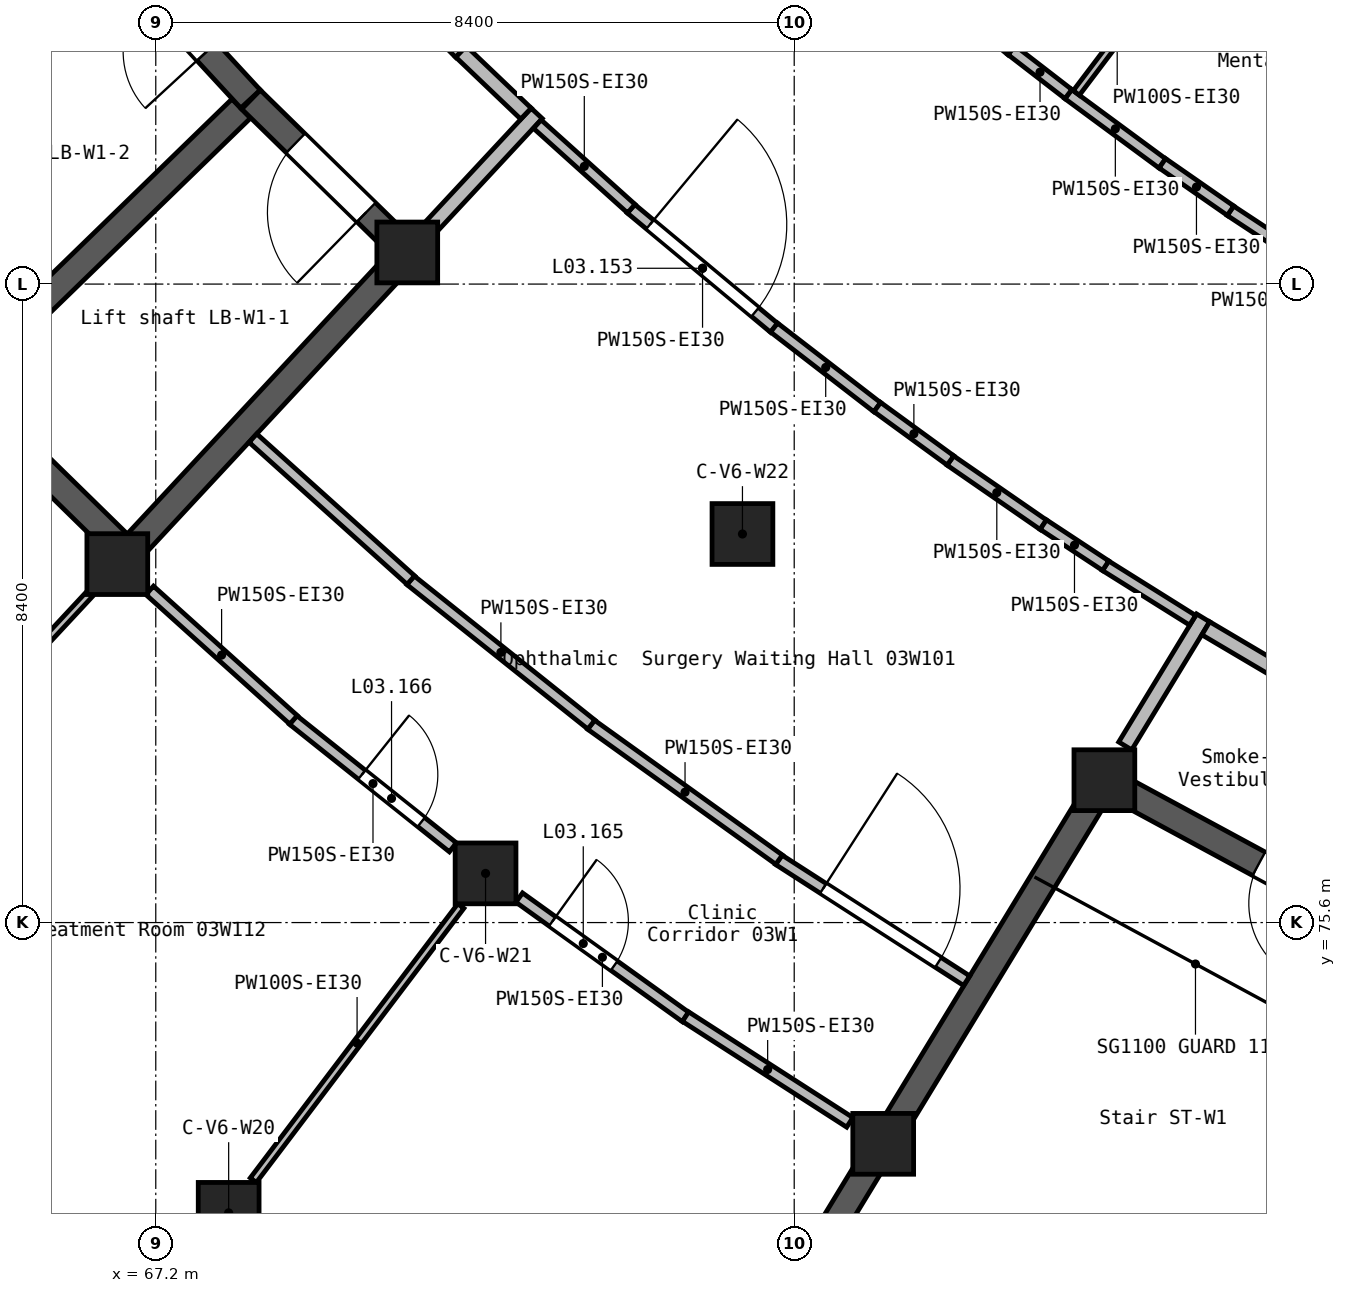
"""IFC4 building model, lengths in metres.
Left out: names, types, materials, properties, quantities, classifications, styles, units other than length and angle.
Written with IfcOpenShell. Run it as: python <this file> out.ifc"""

import sys

from ifc_helpers import new_model, si_unit, direction, frame, frame_2d, origin, origin_2d, place, context, subcontext, project, spatial, rectangle, extrude, element, fill, save


model = new_model("IFC4")
c1 = context("Model", 3, precision=1e-05, world=origin(), true_north=direction((0.0, 1.0)))
c2 = subcontext(c1, "Body", "Model", "MODEL_VIEW")
j1 = project(units=[si_unit("LENGTHUNIT", "METRE"), si_unit("PLANEANGLEUNIT", "RADIAN")], contexts=[c1])
p1 = place(None, origin())
s1 = spatial("IfcSite", under=j1, at=p1, CompositionType="ELEMENT")
p2 = place(p1, origin())
s2 = spatial("IfcBuilding", under=s1, at=p2, CompositionType="ELEMENT")
p3 = place(p2, frame((0.0, 0.0, 16.8)))
s3 = spatial("IfcBuildingStorey", under=s2, at=p3, CompositionType="ELEMENT", Elevation=16.8)
for number, where, z_axis, x_axis in (
    (1, (66.694, 80.316, 0.0), (0.0, 0.0, 1.0), (1.0, 0.0, 0.0)),
    (2, (68.159, 71.781, 0.0), (0.0, 0.0, 1.0), (1.0, 0.0, 0.0)),
    (3, (70.509, 84.416, 0.0), (0.0, 0.0, 1.0), (1.0, 0.0, 0.0)),
    (4, (71.539, 76.247, 0.0), (0.0, 0.0, 1.0), (1.0, 0.0, 0.0)),
    (5, (74.919, 80.712, 0.0), (0.0, 0.0, 1.0), (1.0, 0.0, 0.0)),
    (6, (76.771, 72.689, 0.0), (0.0, 0.0, 1.0), (1.0, 0.0, 0.0)),
    (7, (79.681, 77.473, 0.0), (0.0, 0.0, 1.0), (1.0, 0.0, 0.0)),
):
    element("IfcColumn", number, at=place(p3, frame(where, z_axis=z_axis, x_axis=x_axis)), inside=s3, PredefinedType="COLUMN", context=c2, shape_type="SweptSolid", body=[
        extrude(rectangle(XDim=0.8, YDim=0.8, at=origin_2d()), origin(), (0.0, 0.0, 1.0), 4.2),
    ])
p4 = place(p3, frame((62.305, 84.872, 0.0), z_axis=(0.0, 0.0, 1.0), x_axis=(0.751808220443, 0.659381831471, 0.0)))
e8 = element("IfcWall", 8, at=p4, inside=s3, PredefinedType="SHEAR", context=c2, shape_type="SweptSolid", body=[
    extrude(rectangle(XDim=5.75, YDim=0.35, at=frame_2d((2.875, 0.0))), origin(), (0.0, 0.0, 1.0), 4.2),
])
p5 = place(p3, frame((64.579, 82.666, 0.0), z_axis=(0.0, 0.0, 1.0), x_axis=(0.714695816666, -0.699435407769, 0.0)))
e9 = element("IfcWall", 9, at=p5, inside=s3, PredefinedType="SHEAR", context=c2, shape_type="SweptSolid", body=[
    extrude(rectangle(XDim=2.976, YDim=0.35, at=frame_2d((1.488, 0.0))), origin(), (0.0, 0.0, 1.0), 4.2),
])
p6 = place(p3, frame((64.702, 82.791, 0.0), z_axis=(0.0, 0.0, 1.0), x_axis=(0.717400873641, 0.696660596345, 0.0)))
e10 = element("IfcWall", 10, at=p6, inside=s3, PredefinedType="SHEAR", context=c2, shape_type="SweptSolid", body=[
    extrude(rectangle(XDim=5.05, YDim=0.35, at=frame_2d((2.525, 0.0))), origin(), (0.0, 0.0, 1.0), 4.2),
])
p7 = place(p3, frame((66.712, 80.334, 0.0), z_axis=(0.0, 0.0, 1.0), x_axis=(0.681084356202, 0.732204957465, 0.0)))
e11 = element("IfcWall", 11, at=p7, inside=s3, PredefinedType="SHEAR", context=c2, shape_type="SweptSolid", body=[
    extrude(rectangle(XDim=5.75, YDim=0.35, at=frame_2d((2.875, 0.0))), origin(), (0.0, 0.0, 1.0), 4.2),
])
p8 = place(p3, frame((68.447, 86.434, 0.0), z_axis=(0.0, 0.0, 1.0), x_axis=(-0.678058558992, 0.735007884704, 0.0)))
e12 = element("IfcWall", 12, at=p8, inside=s3, PredefinedType="SHEAR", context=c2, shape_type="SweptSolid", body=[
    extrude(rectangle(XDim=2.701, YDim=0.35, at=frame_2d((1.35, 0.0))), origin(), (0.0, 0.0, 1.0), 4.2),
])
p9 = place(p8, frame((0.85, 0.0, 0.0)))
e13 = element("IfcOpeningElement", 13, at=p9, cuts=e12, PredefinedType="OPENING", context=c2, shape_type="SweptSolid", body=[
    extrude(rectangle(XDim=1.1, YDim=2.1, at=frame_2d((0.55, 1.05))), frame((0.0, 0.185, 0.0), z_axis=(0.0, -1.0, 0.0), x_axis=(1.0, 0.0, 0.0)), (0.0, 0.0, 1.0), 0.37),
])
p10 = place(p3, frame((70.384, 84.538, 0.0), z_axis=(0.0, 0.0, 1.0), x_axis=(-0.714701443082, 0.699429658548, 0.0)))
e14 = element("IfcWall", 14, at=p10, inside=s3, PredefinedType="SHEAR", context=c2, shape_type="SweptSolid", body=[
    extrude(rectangle(XDim=2.702, YDim=0.35, at=frame_2d((1.351, 0.0))), origin(), (0.0, 0.0, 1.0), 4.2),
])
p11 = place(p10, frame((0.581, 0.0, 0.0)))
e15 = element("IfcOpeningElement", 15, at=p11, cuts=e14, PredefinedType="OPENING", context=c2, shape_type="SweptSolid", body=[
    extrude(rectangle(XDim=1.3, YDim=2.1, at=frame_2d((0.65, 1.05))), frame((0.0, 0.185, 0.0), z_axis=(0.0, -1.0, 0.0), x_axis=(1.0, 0.0, 0.0)), (0.0, 0.0, 1.0), 0.37),
])
p12 = place(p3, frame((75.848, 71.173, 0.0), z_axis=(0.0, 0.0, 1.0), x_axis=(0.51973149438, 0.854329663391, 0.0)))
e16 = element("IfcWall", 16, at=p12, inside=s3, PredefinedType="SHEAR", context=c2, shape_type="SweptSolid", body=[
    extrude(rectangle(XDim=7.55, YDim=0.35, at=frame_2d((3.775, 0.0))), origin(), (0.0, 0.0, 1.0), 4.2),
])
p13 = place(p3, frame((81.572, 68.077, 0.0), z_axis=(0.0, 0.0, 1.0), x_axis=(0.430592498036, 0.90254645345, 0.0)))
e17 = element("IfcWall", 17, at=p13, inside=s3, PredefinedType="SHEAR", context=c2, shape_type="SweptSolid", body=[
    extrude(rectangle(XDim=7.55, YDim=0.35, at=frame_2d((3.775, 0.0))), origin(), (0.0, 0.0, 1.0), 4.2),
])
p14 = place(p3, frame((84.593, 74.816, 0.0), z_axis=(0.0, 0.0, 1.0), x_axis=(-0.879585553739, 0.475740742058, 0.0)))
e18 = element("IfcWall", 18, at=p14, inside=s3, PredefinedType="SHEAR", context=c2, shape_type="SweptSolid", body=[
    extrude(rectangle(XDim=5.409, YDim=0.35, at=frame_2d((2.705, 0.0))), origin(), (0.0, 0.0, 1.0), 4.2),
])
p15 = place(p14, frame((2.174, 0.0, 0.0)))
e19 = element("IfcOpeningElement", 19, at=p15, cuts=e18, PredefinedType="OPENING", context=c2, shape_type="SweptSolid", body=[
    extrude(rectangle(XDim=1.1, YDim=2.1, at=frame_2d((0.55, 1.05))), frame((0.0, 0.185, 0.0), z_axis=(0.0, -1.0, 0.0), x_axis=(1.0, 0.0, 0.0)), (0.0, 0.0, 1.0), 0.37),
])
p16 = place(p3, frame((70.837, 84.769, 0.0), z_axis=(0.0, 0.0, 1.0), x_axis=(0.681244203436, 0.732056237789, 0.0)))
e20 = element("IfcWall", 20, at=p16, inside=s3, PredefinedType="SOLIDWALL", context=c2, shape_type="SweptSolid", body=[
    extrude(rectangle(XDim=2.018, YDim=0.2, at=frame_2d((1.009, 0.0))), origin(), (0.0, 0.0, 1.0), 3.9),
])
p17 = place(p3, frame((79.955, 77.924, 0.0), z_axis=(0.0, 0.0, 1.0), x_axis=(0.519675881268, 0.85436349315, 0.0)))
e21 = element("IfcWall", 21, at=p17, inside=s3, PredefinedType="SOLIDWALL", context=c2, shape_type="SweptSolid", body=[
    extrude(rectangle(XDim=1.972, YDim=0.2, at=frame_2d((0.986, 0.0))), origin(), (0.0, 0.0, 1.0), 3.9),
])
p18 = place(p3, frame((70.101, 88.174, 0.0), z_axis=(0.0, 0.0, 1.0), x_axis=(0.705714994949, -0.708495833371, 0.0)))
e22 = element("IfcWall", 22, at=p18, inside=s3, PredefinedType="SOLIDWALL", context=c2, shape_type="SweptSolid", body=[
    extrude(rectangle(XDim=1.58, YDim=0.2, at=frame_2d((0.79, 0.0))), origin(), (0.0, 0.0, 1.0), 3.9),
])
p19 = place(p18, frame((0.19, 0.0, 0.0)))
e23 = element("IfcOpeningElement", 23, at=p19, cuts=e22, PredefinedType="OPENING", context=c2, shape_type="SweptSolid", body=[
    extrude(rectangle(XDim=1.2, YDim=2.1, at=frame_2d((0.6, 1.05))), frame((0.0, 0.11, 0.0), z_axis=(0.0, -1.0, 0.0), x_axis=(1.0, 0.0, 0.0)), (0.0, 0.0, 1.0), 0.22),
])
p20 = place(p3, frame((81.015, 79.471, 0.0), z_axis=(0.0, 0.0, 1.0), x_axis=(0.860926528214, -0.508729312127, 0.0)))
e24 = element("IfcWall", 24, at=p20, inside=s3, PredefinedType="SOLIDWALL", context=c2, shape_type="SweptSolid", body=[
    extrude(rectangle(XDim=1.379, YDim=0.2, at=frame_2d((0.689, 0.0))), origin(), (0.0, 0.0, 1.0), 3.9),
])
p21 = place(p3, frame((71.217, 87.058, 0.0), z_axis=(0.0, 0.0, 1.0), x_axis=(0.723660671666, -0.6901559478, 0.0)))
e25 = element("IfcWall", 25, at=p21, inside=s3, PredefinedType="SOLIDWALL", context=c2, shape_type="SweptSolid", body=[
    extrude(rectangle(XDim=1.18, YDim=0.2, at=frame_2d((0.59, 0.0))), origin(), (0.0, 0.0, 1.0), 3.9),
])
p22 = place(p3, frame((71.982, 75.929, 0.0), z_axis=(0.0, 0.0, 1.0), x_axis=(0.812329236441, -0.583199118332, 0.0)))
e26 = element("IfcWall", 26, at=p22, inside=s3, PredefinedType="PARTITIONING", context=c2, shape_type="SweptSolid", body=[
    extrude(rectangle(XDim=2.695, YDim=0.15, at=frame_2d((1.347, 0.0))), origin(), (0.0, 0.0, 1.0), 3.9),
])
p23 = place(p22, frame((0.537, 0.0, 0.0)))
e27 = element("IfcOpeningElement", 27, at=p23, cuts=e26, PredefinedType="OPENING", context=c2, shape_type="SweptSolid", body=[
    extrude(rectangle(XDim=1.0, YDim=2.1, at=frame_2d((0.5, 1.05))), frame((0.0, 0.085, 0.0), z_axis=(0.0, -1.0, 0.0), x_axis=(1.0, 0.0, 0.0)), (0.0, 0.0, 1.0), 0.17),
])
p24 = place(p3, frame((69.006, 78.267, 0.0), z_axis=(0.0, 0.0, 1.0), x_axis=(0.781841800916, -0.623476862715, 0.0)))
e28 = element("IfcWall", 28, at=p24, inside=s3, PredefinedType="PARTITIONING", context=c2, shape_type="SweptSolid", body=[
    extrude(rectangle(XDim=2.69, YDim=0.15, at=frame_2d((1.345, 0.0))), origin(), (0.0, 0.0, 1.0), 3.9),
])
p25 = place(p24, frame((1.157, 0.0, 0.0)))
e29 = element("IfcOpeningElement", 29, at=p25, cuts=e28, PredefinedType="OPENING", context=c2, shape_type="SweptSolid", body=[
    extrude(rectangle(XDim=1.0, YDim=2.1, at=frame_2d((0.5, 1.05))), frame((0.0, 0.085, 0.0), z_axis=(0.0, -1.0, 0.0), x_axis=(1.0, 0.0, 0.0)), (0.0, 0.0, 1.0), 0.17),
])
p26 = place(p3, frame((74.17, 74.362, 0.0), z_axis=(0.0, 0.0, 1.0), x_axis=(0.840928399131, -0.541146401203, 0.0)))
e30 = element("IfcWall", 30, at=p26, inside=s3, PredefinedType="PARTITIONING", context=c2, shape_type="SweptSolid", body=[
    extrude(rectangle(XDim=2.57, YDim=0.15, at=frame_2d((1.285, 0.0))), origin(), (0.0, 0.0, 1.0), 3.9),
])
p27 = place(p3, frame((67.12, 79.971, 0.0), z_axis=(0.0, 0.0, 1.0), x_axis=(0.743284610851, -0.668975326355, 0.0)))
e31 = element("IfcWall", 31, at=p27, inside=s3, PredefinedType="PARTITIONING", context=c2, shape_type="SweptSolid", body=[
    extrude(rectangle(XDim=2.546, YDim=0.15, at=frame_2d((1.273, 0.0))), origin(), (0.0, 0.0, 1.0), 3.9),
])
p28 = place(p3, frame((75.396, 76.427, 0.0), z_axis=(0.0, 0.0, 1.0), x_axis=(0.840919451001, -0.541160306128, 0.0)))
e32 = element("IfcWall", 32, at=p28, inside=s3, PredefinedType="PARTITIONING", context=c2, shape_type="SweptSolid", body=[
    extrude(rectangle(XDim=2.941, YDim=0.15, at=frame_2d((1.47, 0.0))), origin(), (0.0, 0.0, 1.0), 3.9),
])
p29 = place(p28, frame((0.697, 0.0, 0.0)))
e33 = element("IfcOpeningElement", 33, at=p29, cuts=e32, PredefinedType="OPENING", context=c2, shape_type="SweptSolid", body=[
    extrude(rectangle(XDim=1.8, YDim=2.1, at=frame_2d((0.9, 1.05))), frame((0.0, 0.085, 0.0), z_axis=(0.0, -1.0, 0.0), x_axis=(1.0, 0.0, 0.0)), (0.0, 0.0, 1.0), 0.17),
])
for number, where, z_axis, x_axis in (
    (34, (72.926, 78.204, 0.0), (0.0, 0.0, 1.0), (0.812, -0.583, 0.0)),
    (35, (70.55, 80.105, 0.0), (0.0, 0.0, 1.0), (0.782, -0.624, 0.0)),
):
    element("IfcWall", number, at=place(p3, frame(where, z_axis=z_axis, x_axis=x_axis)), inside=s3, PredefinedType="PARTITIONING", context=c2, shape_type="SweptSolid", body=[
        extrude(rectangle(XDim=3.046, YDim=0.15, at=frame_2d((1.523, 0.0))), origin(), (0.0, 0.0, 1.0), 3.9),
    ])
p30 = place(p3, frame((68.478, 81.974, 0.0), z_axis=(0.0, 0.0, 1.0), x_axis=(0.743546016741, -0.66868476952, 0.0)))
e36 = element("IfcWall", 36, at=p30, inside=s3, PredefinedType="PARTITIONING", context=c2, shape_type="SweptSolid", body=[
    extrude(rectangle(XDim=2.795, YDim=0.15, at=frame_2d((1.397, 0.0))), origin(), (0.0, 0.0, 1.0), 3.9),
])
p31 = place(p3, frame((73.452, 84.992, 0.0), z_axis=(0.0, 0.0, 1.0), x_axis=(0.768531506517, -0.639811943849, 0.0)))
e37 = element("IfcWall", 37, at=p31, inside=s3, PredefinedType="PARTITIONING", context=c2, shape_type="SweptSolid", body=[
    extrude(rectangle(XDim=2.45, YDim=0.15, at=frame_2d((1.225, 0.0))), origin(), (0.0, 0.0, 1.0), 3.9),
])
p32 = place(p31, frame((0.325, 0.0, 0.0)))
e38 = element("IfcOpeningElement", 38, at=p32, cuts=e37, PredefinedType="OPENING", context=c2, shape_type="SweptSolid", body=[
    extrude(rectangle(XDim=1.8, YDim=2.1, at=frame_2d((0.9, 1.05))), frame((0.0, 0.085, 0.0), z_axis=(0.0, -1.0, 0.0), x_axis=(1.0, 0.0, 0.0)), (0.0, 0.0, 1.0), 0.17),
])
p33 = place(p3, frame((72.22, 86.105, 0.0), z_axis=(0.0, 0.0, 1.0), x_axis=(0.743337937966, -0.668916070954, 0.0)))
e39 = element("IfcWall", 39, at=p33, inside=s3, PredefinedType="PARTITIONING", context=c2, shape_type="SweptSolid", body=[
    extrude(rectangle(XDim=1.663, YDim=0.15, at=frame_2d((0.832, 0.0))), origin(), (0.0, 0.0, 1.0), 3.9),
])
p34 = place(p3, frame((77.051, 88.236, 0.0), z_axis=(0.0, 0.0, 1.0), x_axis=(0.771517511576, -0.636208086502, 0.0)))
e40 = element("IfcWall", 40, at=p34, inside=s3, PredefinedType="PARTITIONING", context=c2, shape_type="SweptSolid", body=[
    extrude(rectangle(XDim=1.828, YDim=0.15, at=frame_2d((0.914, 0.0))), origin(), (0.0, 0.0, 1.0), 3.9),
])
p35 = place(p3, frame((75.335, 83.428, 0.0), z_axis=(0.0, 0.0, 1.0), x_axis=(0.791538398042, -0.611119435483, 0.0)))
e41 = element("IfcWall", 41, at=p35, inside=s3, PredefinedType="PARTITIONING", context=c2, shape_type="SweptSolid", body=[
    extrude(rectangle(XDim=1.716, YDim=0.15, at=frame_2d((0.858, 0.0))), origin(), (0.0, 0.0, 1.0), 3.9),
])
p36 = place(p3, frame((79.206, 86.5, 0.0), z_axis=(0.0, 0.0, 1.0), x_axis=(0.804960127747, -0.593328907721, 0.0)))
e42 = element("IfcWall", 42, at=p36, inside=s3, PredefinedType="PARTITIONING", context=c2, shape_type="SweptSolid", body=[
    extrude(rectangle(XDim=1.539, YDim=0.15, at=frame_2d((0.77, 0.0))), origin(), (0.0, 0.0, 1.0), 3.9),
])
p37 = place(p3, frame((79.695, 80.295, 0.0), z_axis=(0.0, 0.0, 1.0), x_axis=(0.847541618724, -0.530728936964, 0.0)))
e43 = element("IfcWall", 43, at=p37, inside=s3, PredefinedType="PARTITIONING", context=c2, shape_type="SweptSolid", body=[
    extrude(rectangle(XDim=1.353, YDim=0.15, at=frame_2d((0.676, 0.0))), origin(), (0.0, 0.0, 1.0), 3.9),
])
p38 = place(p3, frame((77.653, 81.68, 0.0), z_axis=(0.0, 0.0, 1.0), x_axis=(0.822646640465, -0.568552992194, 0.0)))
e44 = element("IfcWall", 44, at=p38, inside=s3, PredefinedType="PARTITIONING", context=c2, shape_type="SweptSolid", body=[
    extrude(rectangle(XDim=1.488, YDim=0.15, at=frame_2d((0.744, 0.0))), origin(), (0.0, 0.0, 1.0), 3.9),
])
p39 = place(p3, frame((76.693, 82.382, 0.0), z_axis=(0.0, 0.0, 1.0), x_axis=(0.808088805309, -0.589060678312, 0.0)))
e45 = element("IfcWall", 45, at=p39, inside=s3, PredefinedType="PARTITIONING", context=c2, shape_type="SweptSolid", body=[
    extrude(rectangle(XDim=1.192, YDim=0.15, at=frame_2d((0.596, 0.0))), origin(), (0.0, 0.0, 1.0), 3.9),
])
p40 = place(p3, frame((81.338, 84.965, 0.0), z_axis=(0.0, 0.0, 1.0), x_axis=(0.834958204617, -0.550313362134, 0.0)))
e46 = element("IfcWall", 46, at=p40, inside=s3, PredefinedType="PARTITIONING", context=c2, shape_type="SweptSolid", body=[
    extrude(rectangle(XDim=1.389, YDim=0.15, at=frame_2d((0.695, 0.0))), origin(), (0.0, 0.0, 1.0), 3.9),
])
p41 = place(p3, frame((80.444, 85.589, 0.0), z_axis=(0.0, 0.0, 1.0), x_axis=(0.821096473197, -0.570789437274, 0.0)))
e47 = element("IfcWall", 47, at=p41, inside=s3, PredefinedType="PARTITIONING", context=c2, shape_type="SweptSolid", body=[
    extrude(rectangle(XDim=1.093, YDim=0.15, at=frame_2d((0.546, 0.0))), origin(), (0.0, 0.0, 1.0), 3.9),
])
p42 = place(p3, frame((78.877, 80.836, 0.0), z_axis=(0.0, 0.0, 1.0), x_axis=(0.835209839134, -0.549931381733, 0.0)))
e48 = element("IfcWall", 48, at=p42, inside=s3, PredefinedType="PARTITIONING", context=c2, shape_type="SweptSolid", body=[
    extrude(rectangle(XDim=0.982, YDim=0.15, at=frame_2d((0.491, 0.0))), origin(), (0.0, 0.0, 1.0), 3.9),
])
p43 = place(p3, frame((78.46, 87.077, 0.0), z_axis=(0.0, 0.0, 1.0), x_axis=(0.791671493317, -0.610947008069, 0.0)))
e49 = element("IfcWall", 49, at=p43, inside=s3, PredefinedType="PARTITIONING", context=c2, shape_type="SweptSolid", body=[
    extrude(rectangle(XDim=0.944, YDim=0.15, at=frame_2d((0.472, 0.0))), origin(), (0.0, 0.0, 1.0), 3.9),
])
p44 = place(p3, frame((63.244, 76.607, 0.0), z_axis=(0.0, 0.0, 1.0), x_axis=(0.681263193371, 0.732038565485, 0.0)))
e50 = element("IfcWall", 50, at=p44, inside=s3, PredefinedType="PARTITIONING", context=c2, shape_type="SweptSolid", body=[
    extrude(rectangle(XDim=4.529, YDim=0.1, at=frame_2d((2.265, 0.0))), origin(), (0.0, 0.0, 1.0), 3.9),
])
p45 = place(p3, frame((68.483, 72.211, 0.0), z_axis=(0.0, 0.0, 1.0), x_axis=(0.603594766434, 0.797291262923, 0.0)))
e51 = element("IfcWall", 51, at=p45, inside=s3, PredefinedType="PARTITIONING", context=c2, shape_type="SweptSolid", body=[
    extrude(rectangle(XDim=4.524, YDim=0.1, at=frame_2d((2.262, 0.0))), origin(), (0.0, 0.0, 1.0), 3.9),
])
p46 = place(p3, frame((79.312, 86.515, 0.0), z_axis=(0.0, 0.0, 1.0), x_axis=(0.603588624137, 0.797295912954, 0.0)))
e52 = element("IfcWall", 52, at=p46, inside=s3, PredefinedType="PARTITIONING", context=c2, shape_type="SweptSolid", body=[
    extrude(rectangle(XDim=1.782, YDim=0.1, at=frame_2d((0.891, 0.0))), origin(), (0.0, 0.0, 1.0), 3.9),
])
p47 = place(p29, frame((1.8, 0.0, 0.0), z_axis=(0.0, 0.0, 1.0), x_axis=(-1.0, 0.0, 0.0)))
e53 = element("IfcDoor", 53, at=p47, inside=s3, OperationType="DOUBLE_DOOR_SINGLE_SWING", PredefinedType="DOOR", context=c2, shape_type="SweptSolid", body=[
    extrude(rectangle(XDim=1.8, YDim=2.1, at=frame_2d((0.9, 1.05))), frame((0.0, 0.025, 0.0), z_axis=(0.0, -1.0, 0.0), x_axis=(1.0, 0.0, 0.0)), (0.0, 0.0, 1.0), 0.05),
])
fill(e33, e53)
p48 = place(p32, origin())
e54 = element("IfcDoor", 54, at=p48, inside=s3, OperationType="DOUBLE_DOOR_SINGLE_SWING", PredefinedType="DOOR", context=c2, shape_type="SweptSolid", body=[
    extrude(rectangle(XDim=1.8, YDim=2.1, at=frame_2d((0.9, 1.05))), frame((0.0, 0.025, 0.0), z_axis=(0.0, -1.0, 0.0), x_axis=(1.0, 0.0, 0.0)), (0.0, 0.0, 1.0), 0.05),
])
fill(e38, e54)
p49 = place(p23, frame((1.0, 0.0, 0.0), z_axis=(0.0, 0.0, 1.0), x_axis=(-1.0, 0.0, 0.0)))
e55 = element("IfcDoor", 55, at=p49, inside=s3, OperationType="SINGLE_SWING_RIGHT", PredefinedType="DOOR", context=c2, shape_type="SweptSolid", body=[
    extrude(rectangle(XDim=1.0, YDim=2.1, at=frame_2d((0.5, 1.05))), frame((0.0, 0.025, 0.0), z_axis=(0.0, -1.0, 0.0), x_axis=(1.0, 0.0, 0.0)), (0.0, 0.0, 1.0), 0.05),
])
fill(e27, e55)
p50 = place(p25, frame((1.0, 0.0, 0.0), z_axis=(0.0, 0.0, 1.0), x_axis=(-1.0, 0.0, 0.0)))
e56 = element("IfcDoor", 56, at=p50, inside=s3, OperationType="SINGLE_SWING_LEFT", PredefinedType="DOOR", context=c2, shape_type="SweptSolid", body=[
    extrude(rectangle(XDim=1.0, YDim=2.1, at=frame_2d((0.5, 1.05))), frame((0.0, 0.025, 0.0), z_axis=(0.0, -1.0, 0.0), x_axis=(1.0, 0.0, 0.0)), (0.0, 0.0, 1.0), 0.05),
])
fill(e29, e56)
p51 = place(p15, origin())
e57 = element("IfcDoor", 57, at=p51, inside=s3, OperationType="SINGLE_SWING_RIGHT", PredefinedType="DOOR", context=c2, shape_type="SweptSolid", body=[
    extrude(rectangle(XDim=1.1, YDim=2.1, at=frame_2d((0.55, 1.05))), frame((0.0, 0.025, 0.0), z_axis=(0.0, -1.0, 0.0), x_axis=(1.0, 0.0, 0.0)), (0.0, 0.0, 1.0), 0.05),
])
fill(e19, e57)
p52 = place(p11, origin())
e58 = element("IfcDoor", 58, at=p52, inside=s3, OperationType="DOUBLE_DOOR_SLIDING", PredefinedType="DOOR", context=c2, shape_type="SweptSolid", body=[
    extrude(rectangle(XDim=1.3, YDim=2.1, at=frame_2d((0.65, 1.05))), frame((0.0, 0.025, 0.0), z_axis=(0.0, -1.0, 0.0), x_axis=(1.0, 0.0, 0.0)), (0.0, 0.0, 1.0), 0.05),
])
fill(e15, e58)
p53 = place(p9, origin())
e59 = element("IfcDoor", 59, at=p53, inside=s3, OperationType="DOUBLE_DOOR_SLIDING", PredefinedType="DOOR", context=c2, shape_type="SweptSolid", body=[
    extrude(rectangle(XDim=1.1, YDim=2.1, at=frame_2d((0.55, 1.05))), frame((0.0, 0.025, 0.0), z_axis=(0.0, -1.0, 0.0), x_axis=(1.0, 0.0, 0.0)), (0.0, 0.0, 1.0), 0.05),
])
fill(e13, e59)
save(model, sys.argv[1])
